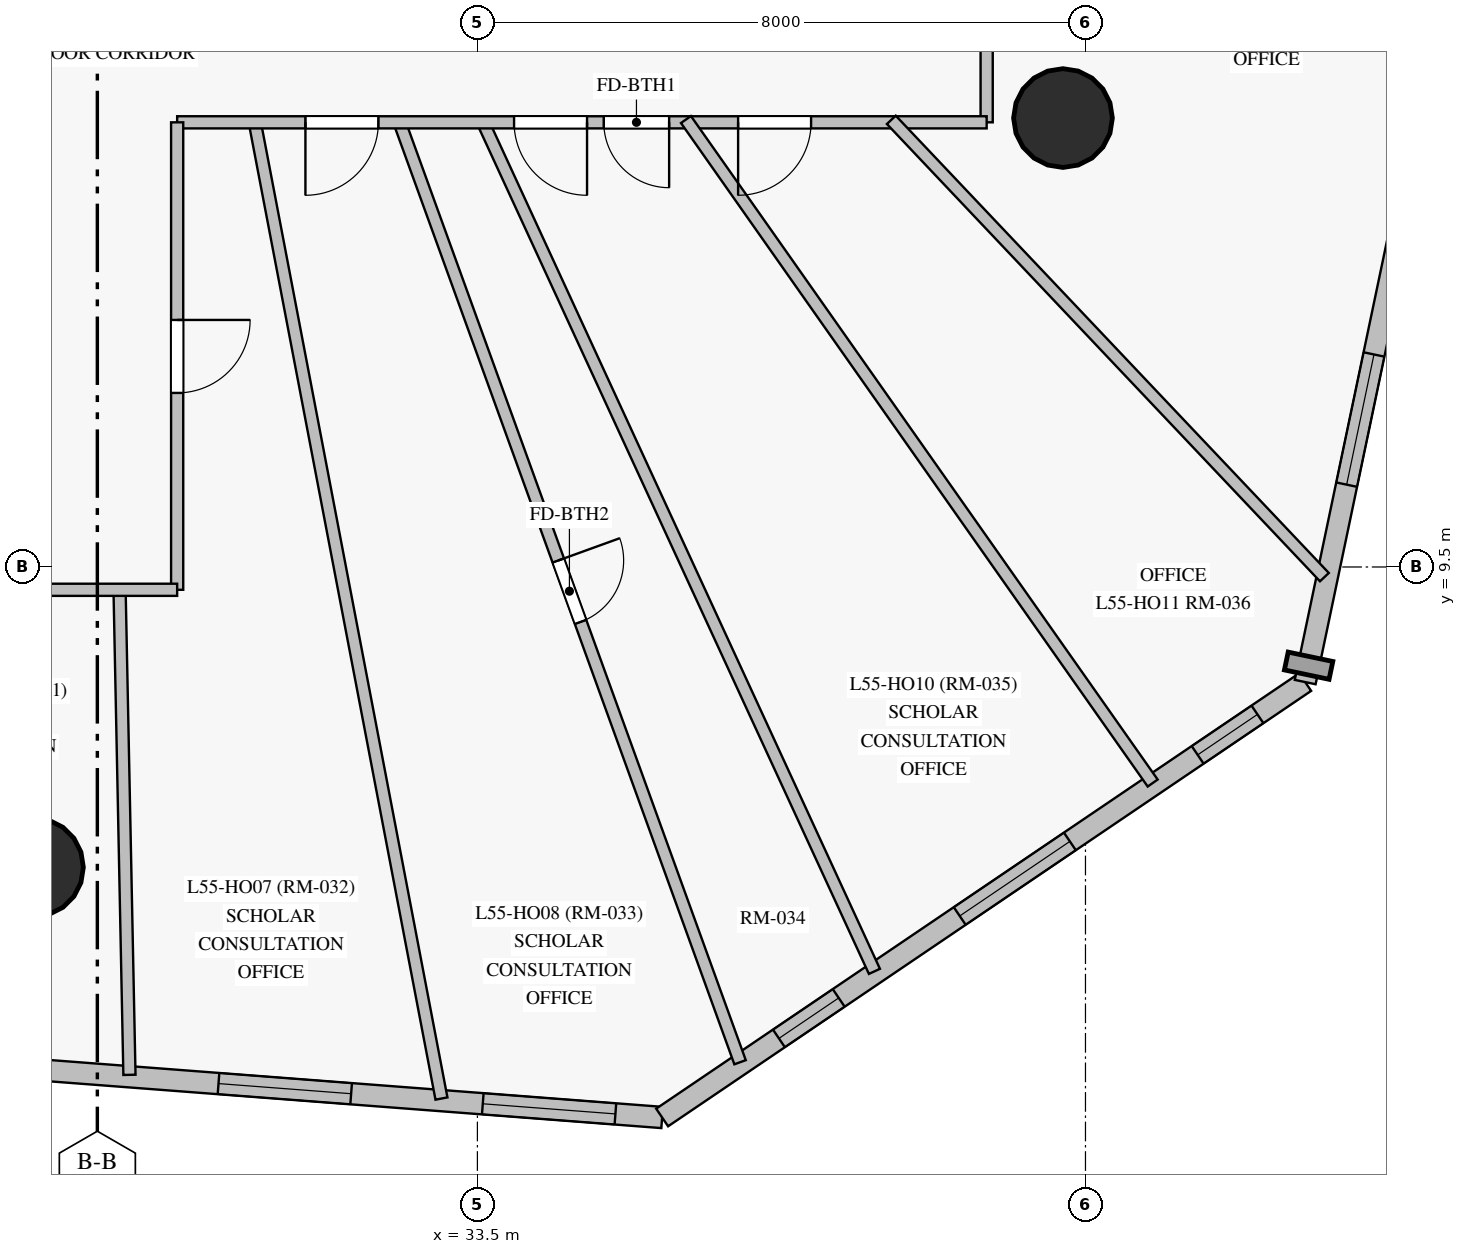
"""IFC4 building model, lengths in metres.
Left out: names, types, materials, properties, quantities, classifications, styles, units other than length and angle.
Written with IfcOpenShell. Run it as: python <this file> out.ifc"""

import sys

from ifc_helpers import new_model, si_unit, direction, frame, frame_2d, origin, origin_with_axes, origin_2d, place, context, subcontext, project, spatial, rectangle, circle, extrude, source, transform, mapped, element, fill, save


model = new_model("IFC4")
c1 = context("Model", 3, precision=1e-05, world=origin(), true_north=direction((0.0, 1.0)))
c2 = subcontext(c1, "Body", "Model", "MODEL_VIEW")
j1 = project(units=[si_unit("LENGTHUNIT", "METRE"), si_unit("PLANEANGLEUNIT", "RADIAN")], contexts=[c1])
p1 = place(None, origin())
s1 = spatial("IfcSite", under=j1, at=p1, CompositionType="ELEMENT")
p2 = place(p1, origin())
s2 = spatial("IfcBuilding", under=s1, at=p2, CompositionType="ELEMENT")
p3 = place(p2, frame((0.0, 0.0, 190.1)))
s3 = spatial("IfcBuildingStorey", under=s2, at=p3, CompositionType="ELEMENT", Elevation=190.1)
m1 = source(origin_with_axes(), c2, "Body", "SweptSolid", [
    extrude(circle(Radius=0.65, at=origin_2d()), origin(), (0.0, 0.0, 1.0), 3.05),
])
for number, where, z_axis, x_axis in (
    (1, (27.666, 5.549, 0.0), (0.0, 0.0, 1.0), (1.0, 0.0, 0.0)),
    (2, (41.204, 15.406, 0.0), (0.0, 0.0, 1.0), (1.0, 0.0, 0.0)),
):
    element("IfcColumn", number, at=place(p3, frame(where, z_axis=z_axis, x_axis=x_axis)), inside=s3, PredefinedType="COLUMN", context=c2, shape_type="MappedRepresentation", body=[
        mapped(m1, transform((0.0, 0.0, 0.0), scale=1.0)),
    ])
p4 = place(p3, frame((22.812, 3.26, 0.0), z_axis=(0.0, 0.0, 1.0), x_axis=(0.997092892989, -0.076195555985, 0.0)))
e3 = element("IfcWall", 3, at=p4, inside=s3, PredefinedType="SOLIDWALL", context=c2, shape_type="SweptSolid", body=[
    extrude(rectangle(XDim=13.156, YDim=0.28, at=frame_2d((6.578, 0.0))), origin(), (0.0, 0.0, 1.0), 2.825),
])
p5 = place(p4, frame((3.117, 0.0, 0.85)))
e4 = element("IfcOpeningElement", 4, at=p5, cuts=e3, PredefinedType="OPENING", context=c2, shape_type="SweptSolid", body=[
    extrude(rectangle(XDim=1.75, YDim=1.65, at=frame_2d((0.875, 0.825))), frame((0.0, 0.15, 0.0), z_axis=(0.0, -1.0, 0.0), x_axis=(1.0, 0.0, 0.0)), (0.0, 0.0, 1.0), 0.3),
])
p6 = place(p4, frame((7.303, 0.0, 0.85)))
e5 = element("IfcOpeningElement", 5, at=p6, cuts=e3, PredefinedType="OPENING", context=c2, shape_type="SweptSolid", body=[
    extrude(rectangle(XDim=1.75, YDim=1.65, at=frame_2d((0.875, 0.825))), frame((0.0, 0.15, 0.0), z_axis=(0.0, -1.0, 0.0), x_axis=(1.0, 0.0, 0.0)), (0.0, 0.0, 1.0), 0.3),
])
p7 = place(p4, frame((10.79, 0.0, 0.85)))
e6 = element("IfcOpeningElement", 6, at=p7, cuts=e3, PredefinedType="OPENING", context=c2, shape_type="SweptSolid", body=[
    extrude(rectangle(XDim=1.75, YDim=1.65, at=frame_2d((0.875, 0.825))), frame((0.0, 0.15, 0.0), z_axis=(0.0, -1.0, 0.0), x_axis=(1.0, 0.0, 0.0)), (0.0, 0.0, 1.0), 0.3),
])
p8 = place(p3, frame((35.93, 2.258, 0.0), z_axis=(0.0, 0.0, 1.0), x_axis=(0.828047519761, 0.560657921569, 0.0)))
e7 = element("IfcWall", 7, at=p8, inside=s3, PredefinedType="SOLIDWALL", context=c2, shape_type="SweptSolid", body=[
    extrude(rectangle(XDim=10.217, YDim=0.28, at=frame_2d((5.108, 0.0))), origin(), (0.0, 0.0, 1.0), 2.825),
])
p9 = place(p8, frame((1.855, 0.0, 0.85)))
e8 = element("IfcOpeningElement", 8, at=p9, cuts=e7, PredefinedType="OPENING", context=c2, shape_type="SweptSolid", body=[
    extrude(rectangle(XDim=0.95, YDim=1.5, at=frame_2d((0.475, 0.75))), frame((0.0, 0.15, 0.0), z_axis=(0.0, -1.0, 0.0), x_axis=(1.0, 0.0, 0.0)), (0.0, 0.0, 1.0), 0.3),
])
p10 = place(p8, frame((4.728, 0.0, 0.85)))
e9 = element("IfcOpeningElement", 9, at=p10, cuts=e7, PredefinedType="OPENING", context=c2, shape_type="SweptSolid", body=[
    extrude(rectangle(XDim=1.75, YDim=1.65, at=frame_2d((0.875, 0.825))), frame((0.0, 0.15, 0.0), z_axis=(0.0, -1.0, 0.0), x_axis=(1.0, 0.0, 0.0)), (0.0, 0.0, 1.0), 0.3),
])
p11 = place(p8, frame((8.509, 0.0, 0.85)))
e10 = element("IfcOpeningElement", 10, at=p11, cuts=e7, PredefinedType="OPENING", context=c2, shape_type="SweptSolid", body=[
    extrude(rectangle(XDim=0.95, YDim=1.5, at=frame_2d((0.475, 0.75))), frame((0.0, 0.15, 0.0), z_axis=(0.0, -1.0, 0.0), x_axis=(1.0, 0.0, 0.0)), (0.0, 0.0, 1.0), 0.3),
])
p12 = place(p3, frame((44.391, 7.986, 0.0), z_axis=(0.0, 0.0, 1.0), x_axis=(0.205520669539, 0.978652775193, 0.0)))
e11 = element("IfcWall", 11, at=p12, inside=s3, PredefinedType="SOLIDWALL", context=c2, shape_type="SweptSolid", body=[
    extrude(rectangle(XDim=14.294, YDim=0.28, at=frame_2d((7.147, 0.0))), origin(), (0.0, 0.0, 1.0), 2.825),
])
p13 = place(p12, frame((2.654, 0.0, 0.85)))
e12 = element("IfcOpeningElement", 12, at=p13, cuts=e11, PredefinedType="OPENING", context=c2, shape_type="SweptSolid", body=[
    extrude(rectangle(XDim=1.75, YDim=1.65, at=frame_2d((0.875, 0.825))), frame((0.0, 0.15, 0.0), z_axis=(0.0, -1.0, 0.0), x_axis=(1.0, 0.0, 0.0)), (0.0, 0.0, 1.0), 0.3),
])
p14 = place(p12, frame((6.226, 0.0, 0.85)))
e13 = element("IfcOpeningElement", 13, at=p14, cuts=e11, PredefinedType="OPENING", context=c2, shape_type="SweptSolid", body=[
    extrude(rectangle(XDim=1.75, YDim=1.65, at=frame_2d((0.875, 0.825))), frame((0.0, 0.15, 0.0), z_axis=(0.0, -1.0, 0.0), x_axis=(1.0, 0.0, 0.0)), (0.0, 0.0, 1.0), 0.3),
])
p15 = place(p12, frame((10.846, 0.0, 0.85)))
e14 = element("IfcOpeningElement", 14, at=p15, cuts=e11, PredefinedType="OPENING", context=c2, shape_type="SweptSolid", body=[
    extrude(rectangle(XDim=1.75, YDim=1.65, at=frame_2d((0.875, 0.825))), frame((0.0, 0.15, 0.0), z_axis=(0.0, -1.0, 0.0), x_axis=(1.0, 0.0, 0.0)), (0.0, 0.0, 1.0), 0.3),
])
p16 = place(p3, frame((40.2, 37.65, 0.0), z_axis=(0.0, 0.0, 1.0), x_axis=(0.0, -1.0, 0.0)))
e15 = element("IfcWall", 15, at=p16, inside=s3, PredefinedType="PARTITIONING", context=c2, shape_type="SweptSolid", body=[
    extrude(rectangle(XDim=22.3, YDim=0.16, at=frame_2d((11.15, 0.0))), origin(), (0.0, 0.0, 1.0), 2.375),
])
p17 = place(p16, frame((19.455, 0.0, 0.0)))
e16 = element("IfcOpeningElement", 16, at=p17, cuts=e15, PredefinedType="OPENING", context=c2, shape_type="SweptSolid", body=[
    extrude(rectangle(XDim=0.96, YDim=2.15, at=frame_2d((0.48, 1.075))), frame((0.0, 0.09, 0.0), z_axis=(0.0, -1.0, 0.0), x_axis=(1.0, 0.0, 0.0)), (0.0, 0.0, 1.0), 0.18),
])
p18 = place(p16, frame((11.265, 0.0, 0.0)))
e17 = element("IfcOpeningElement", 17, at=p18, cuts=e15, PredefinedType="OPENING", context=c2, shape_type="SweptSolid", body=[
    extrude(rectangle(XDim=0.96, YDim=2.15, at=frame_2d((0.48, 1.075))), frame((0.0, 0.09, 0.0), z_axis=(0.0, -1.0, 0.0), x_axis=(1.0, 0.0, 0.0)), (0.0, 0.0, 1.0), 0.18),
])
p19 = place(p16, frame((7.33, 0.0, 0.0)))
e18 = element("IfcOpeningElement", 18, at=p19, cuts=e15, PredefinedType="OPENING", context=c2, shape_type="SweptSolid", body=[
    extrude(rectangle(XDim=0.96, YDim=2.15, at=frame_2d((0.48, 1.075))), frame((0.0, 0.09, 0.0), z_axis=(0.0, -1.0, 0.0), x_axis=(1.0, 0.0, 0.0)), (0.0, 0.0, 1.0), 0.18),
])
p20 = place(p16, frame((5.1, 0.0, 0.0)))
e19 = element("IfcOpeningElement", 19, at=p20, cuts=e15, PredefinedType="OPENING", context=c2, shape_type="SweptSolid", body=[
    extrude(rectangle(XDim=0.96, YDim=2.15, at=frame_2d((0.48, 1.075))), frame((0.0, 0.09, 0.0), z_axis=(0.0, -1.0, 0.0), x_axis=(1.0, 0.0, 0.0)), (0.0, 0.0, 1.0), 0.18),
])
p21 = place(p3, frame((32.466, 15.378, 0.0), z_axis=(0.0, 0.0, 1.0), x_axis=(0.340636438922, -0.940195094902, 0.0)))
e20 = element("IfcWall", 20, at=p21, inside=s3, PredefinedType="PARTITIONING", context=c2, shape_type="SweptSolid", body=[
    extrude(rectangle(XDim=13.182, YDim=0.16, at=frame_2d((6.591, 0.0))), origin(), (0.0, 0.0, 1.0), 2.825),
])
p22 = place(p21, frame((6.161, 0.0, 0.0)))
e21 = element("IfcOpeningElement", 21, at=p22, cuts=e20, PredefinedType="OPENING", context=c2, shape_type="SweptSolid", body=[
    extrude(rectangle(XDim=0.86, YDim=2.04, at=frame_2d((0.43, 1.02))), frame((0.0, 0.09, 0.0), z_axis=(0.0, -1.0, 0.0), x_axis=(1.0, 0.0, 0.0)), (0.0, 0.0, 1.0), 0.18),
])
p23 = place(p3, frame((30.566, 15.379, 0.0), z_axis=(0.0, 0.0, 1.0), x_axis=(0.187830250317, -0.982201505327, 0.0)))
e22 = element("IfcWall", 22, at=p23, inside=s3, PredefinedType="PARTITIONING", context=c2, shape_type="SweptSolid", body=[
    extrude(rectangle(XDim=13.106, YDim=0.16, at=frame_2d((6.553, 0.0))), origin(), (0.0, 0.0, 1.0), 2.825),
])
p24 = place(p3, frame((33.561, 15.377, 0.0), z_axis=(0.0, 0.0, 1.0), x_axis=(0.41866637401, -0.90814011434, 0.0)))
e23 = element("IfcWall", 23, at=p24, inside=s3, PredefinedType="PARTITIONING", context=c2, shape_type="SweptSolid", body=[
    extrude(rectangle(XDim=12.33, YDim=0.16, at=frame_2d((6.165, 0.0))), origin(), (0.0, 0.0, 1.0), 2.825),
])
p25 = place(p3, frame((40.2, 15.35, 0.0), z_axis=(0.0, 0.0, 1.0), x_axis=(-1.0, 0.0, 0.0)))
e24 = element("IfcWall", 24, at=p25, inside=s3, PredefinedType="PARTITIONING", context=c2, shape_type="SweptSolid", body=[
    extrude(rectangle(XDim=10.65, YDim=0.16, at=frame_2d((5.325, 0.0))), origin(), (0.0, 0.0, 1.0), 2.275),
])
p26 = place(p25, frame((8.002, 0.0, 0.0)))
e25 = element("IfcOpeningElement", 25, at=p26, cuts=e24, PredefinedType="OPENING", context=c2, shape_type="SweptSolid", body=[
    extrude(rectangle(XDim=0.96, YDim=2.15, at=frame_2d((0.48, 1.075))), frame((0.0, 0.09, 0.0), z_axis=(0.0, -1.0, 0.0), x_axis=(1.0, 0.0, 0.0)), (0.0, 0.0, 1.0), 0.18),
])
p27 = place(p25, frame((5.258, 0.0, 0.0)))
e26 = element("IfcOpeningElement", 26, at=p27, cuts=e24, PredefinedType="OPENING", context=c2, shape_type="SweptSolid", body=[
    extrude(rectangle(XDim=0.96, YDim=2.15, at=frame_2d((0.48, 1.075))), frame((0.0, 0.09, 0.0), z_axis=(0.0, -1.0, 0.0), x_axis=(1.0, 0.0, 0.0)), (0.0, 0.0, 1.0), 0.18),
])
p28 = place(p25, frame((2.31, 0.0, 0.0)))
e27 = element("IfcOpeningElement", 27, at=p28, cuts=e24, PredefinedType="OPENING", context=c2, shape_type="SweptSolid", body=[
    extrude(rectangle(XDim=0.96, YDim=2.15, at=frame_2d((0.48, 1.075))), frame((0.0, 0.09, 0.0), z_axis=(0.0, -1.0, 0.0), x_axis=(1.0, 0.0, 0.0)), (0.0, 0.0, 1.0), 0.18),
])
p29 = place(p25, frame((4.177, 0.0, 0.0)))
e28 = element("IfcOpeningElement", 28, at=p29, cuts=e24, PredefinedType="OPENING", context=c2, shape_type="SweptSolid", body=[
    extrude(rectangle(XDim=0.86, YDim=2.1, at=frame_2d((0.43, 1.05))), frame((0.0, 0.09, 0.0), z_axis=(0.0, -1.0, 0.0), x_axis=(1.0, 0.0, 0.0)), (0.0, 0.0, 1.0), 0.18),
])
p30 = place(p3, frame((36.244, 15.387, 0.0), z_axis=(0.0, 0.0, 1.0), x_axis=(0.575352301444, -0.817905697023, 0.0)))
e29 = element("IfcWall", 29, at=p30, inside=s3, PredefinedType="PARTITIONING", context=c2, shape_type="SweptSolid", body=[
    extrude(rectangle(XDim=10.672, YDim=0.16, at=frame_2d((5.336, 0.0))), origin(), (0.0, 0.0, 1.0), 2.825),
])
p31 = place(p3, frame((38.946, 15.383, 0.0), z_axis=(0.0, 0.0, 1.0), x_axis=(0.687604884765, -0.726085065572, 0.0)))
e30 = element("IfcWall", 30, at=p31, inside=s3, PredefinedType="PARTITIONING", context=c2, shape_type="SweptSolid", body=[
    extrude(rectangle(XDim=8.286, YDim=0.16, at=frame_2d((4.143, 0.0))), origin(), (0.0, 0.0, 1.0), 2.825),
])
p32 = place(p3, frame((28.792, 9.23, 0.0), z_axis=(0.0, 0.0, 1.0), x_axis=(0.020368189048, -0.999792546919, 0.0)))
e31 = element("IfcWall", 31, at=p32, inside=s3, PredefinedType="PARTITIONING", context=c2, shape_type="SweptSolid", body=[
    extrude(rectangle(XDim=6.413, YDim=0.16, at=frame_2d((3.206, 0.0))), origin(), (0.0, 0.0, 1.0), 2.825),
])
p33 = place(p3, frame((29.55, 15.35, 0.0), z_axis=(0.0, 0.0, 1.0), x_axis=(0.0, -1.0, 0.0)))
e32 = element("IfcWall", 32, at=p33, inside=s3, PredefinedType="PARTITIONING", context=c2, shape_type="SweptSolid", body=[
    extrude(rectangle(XDim=6.15, YDim=0.16, at=frame_2d((3.075, 0.0))), origin(), (0.0, 0.0, 1.0), 2.825),
])
p34 = place(p33, frame((2.6, 0.0, 0.0)))
e33 = element("IfcOpeningElement", 33, at=p34, cuts=e32, PredefinedType="OPENING", context=c2, shape_type="SweptSolid", body=[
    extrude(rectangle(XDim=0.96, YDim=2.15, at=frame_2d((0.48, 1.075))), frame((0.0, 0.09, 0.0), z_axis=(0.0, -1.0, 0.0), x_axis=(1.0, 0.0, 0.0)), (0.0, 0.0, 1.0), 0.18),
])
p35 = place(p3, frame((29.55, 9.2, 0.0), z_axis=(0.0, 0.0, 1.0), x_axis=(-1.0, 0.0, 0.0)))
e34 = element("IfcWall", 34, at=p35, inside=s3, PredefinedType="PARTITIONING", context=c2, shape_type="SweptSolid", body=[
    extrude(rectangle(XDim=2.0, YDim=0.16, at=frame_2d((1.0, 0.0))), origin(), (0.0, 0.0, 1.0), 2.495),
])
m2 = source(origin_with_axes(), c2, "Body", "SweptSolid", [
    extrude(rectangle(XDim=1.75, YDim=1.65, at=frame_2d((0.875, 0.825))), frame((0.0, 0.03, 0.0), z_axis=(0.0, -1.0, 0.0), x_axis=(1.0, 0.0, 0.0)), (0.0, 0.0, 1.0), 0.06),
])
p36 = place(p6, origin())
e35 = element("IfcWindow", 35, at=p36, inside=s3, PartitioningType="SINGLE_PANEL", PredefinedType="WINDOW", context=c2, shape_type="MappedRepresentation", body=[
    mapped(m2, transform((0.0, 0.0, 0.0), scale=1.0)),
])
fill(e5, e35)
p37 = place(p7, origin())
e36 = element("IfcWindow", 36, at=p37, inside=s3, PartitioningType="SINGLE_PANEL", PredefinedType="WINDOW", context=c2, shape_type="MappedRepresentation", body=[
    mapped(m2, transform((0.0, 0.0, 0.0), scale=1.0)),
])
fill(e6, e36)
m3 = source(origin_with_axes(), c2, "Body", "SweptSolid", [
    extrude(rectangle(XDim=0.95, YDim=1.5, at=frame_2d((0.475, 0.75))), frame((0.0, 0.03, 0.0), z_axis=(0.0, -1.0, 0.0), x_axis=(1.0, 0.0, 0.0)), (0.0, 0.0, 1.0), 0.06),
])
p38 = place(p9, origin())
e37 = element("IfcWindow", 37, at=p38, inside=s3, PartitioningType="SINGLE_PANEL", PredefinedType="WINDOW", context=c2, shape_type="MappedRepresentation", body=[
    mapped(m3, transform((0.0, 0.0, 0.0), scale=1.0)),
])
fill(e8, e37)
p39 = place(p10, origin())
e38 = element("IfcWindow", 38, at=p39, inside=s3, PartitioningType="SINGLE_PANEL", PredefinedType="WINDOW", context=c2, shape_type="MappedRepresentation", body=[
    mapped(m2, transform((0.0, 0.0, 0.0), scale=1.0)),
])
fill(e9, e38)
p40 = place(p11, origin())
e39 = element("IfcWindow", 39, at=p40, inside=s3, PartitioningType="SINGLE_PANEL", PredefinedType="WINDOW", context=c2, shape_type="MappedRepresentation", body=[
    mapped(m3, transform((0.0, 0.0, 0.0), scale=1.0)),
])
fill(e10, e39)
p41 = place(p13, origin())
e40 = element("IfcWindow", 40, at=p41, inside=s3, PartitioningType="SINGLE_PANEL", PredefinedType="WINDOW", context=c2, shape_type="MappedRepresentation", body=[
    mapped(m2, transform((0.0, 0.0, 0.0), scale=1.0)),
])
fill(e12, e40)
m4 = source(origin_with_axes(), c2, "Body", "SweptSolid", [
    extrude(rectangle(XDim=0.96, YDim=2.15, at=frame_2d((0.48, 1.075))), frame((0.0, 0.025, 0.0), z_axis=(0.0, -1.0, 0.0), x_axis=(1.0, 0.0, 0.0)), (0.0, 0.0, 1.0), 0.05),
])
p42 = place(p34, origin())
e41 = element("IfcDoor", 41, at=p42, inside=s3, OperationType="SINGLE_SWING_LEFT", PredefinedType="DOOR", context=c2, shape_type="MappedRepresentation", body=[
    mapped(m4, transform((0.0, 0.0, 0.0), scale=1.0)),
])
fill(e33, e41)
p43 = place(p26, origin())
e42 = element("IfcDoor", 42, at=p43, inside=s3, OperationType="SINGLE_SWING_RIGHT", PredefinedType="DOOR", context=c2, shape_type="MappedRepresentation", body=[
    mapped(m4, transform((0.0, 0.0, 0.0), scale=1.0)),
])
fill(e25, e42)
p44 = place(p27, origin())
e43 = element("IfcDoor", 43, at=p44, inside=s3, OperationType="SINGLE_SWING_LEFT", PredefinedType="DOOR", context=c2, shape_type="MappedRepresentation", body=[
    mapped(m4, transform((0.0, 0.0, 0.0), scale=1.0)),
])
fill(e26, e43)
p45 = place(p28, origin())
e44 = element("IfcDoor", 44, at=p45, inside=s3, OperationType="SINGLE_SWING_RIGHT", PredefinedType="DOOR", context=c2, shape_type="MappedRepresentation", body=[
    mapped(m4, transform((0.0, 0.0, 0.0), scale=1.0)),
])
fill(e27, e44)
m5 = source(origin_with_axes(), c2, "Body", "SweptSolid", [
    extrude(rectangle(XDim=0.86, YDim=2.1, at=frame_2d((0.43, 1.05))), frame((0.0, 0.025, 0.0), z_axis=(0.0, -1.0, 0.0), x_axis=(1.0, 0.0, 0.0)), (0.0, 0.0, 1.0), 0.05),
])
p46 = place(p29, origin())
e45 = element("IfcDoor", 45, at=p46, inside=s3, OperationType="SINGLE_SWING_LEFT", PredefinedType="DOOR", context=c2, shape_type="MappedRepresentation", body=[
    mapped(m5, transform((0.0, 0.0, 0.0), scale=1.0)),
])
fill(e28, e45)
m6 = source(origin_with_axes(), c2, "Body", "SweptSolid", [
    extrude(rectangle(XDim=0.86, YDim=2.04, at=frame_2d((0.43, 1.02))), frame((0.0, 0.025, 0.0), z_axis=(0.0, -1.0, 0.0), x_axis=(1.0, 0.0, 0.0)), (0.0, 0.0, 1.0), 0.05),
])
p47 = place(p22, origin())
e46 = element("IfcDoor", 46, at=p47, inside=s3, OperationType="SINGLE_SWING_LEFT", PredefinedType="DOOR", context=c2, shape_type="MappedRepresentation", body=[
    mapped(m6, transform((0.0, 0.0, 0.0), scale=1.0)),
])
fill(e21, e46)
save(model, sys.argv[1])
